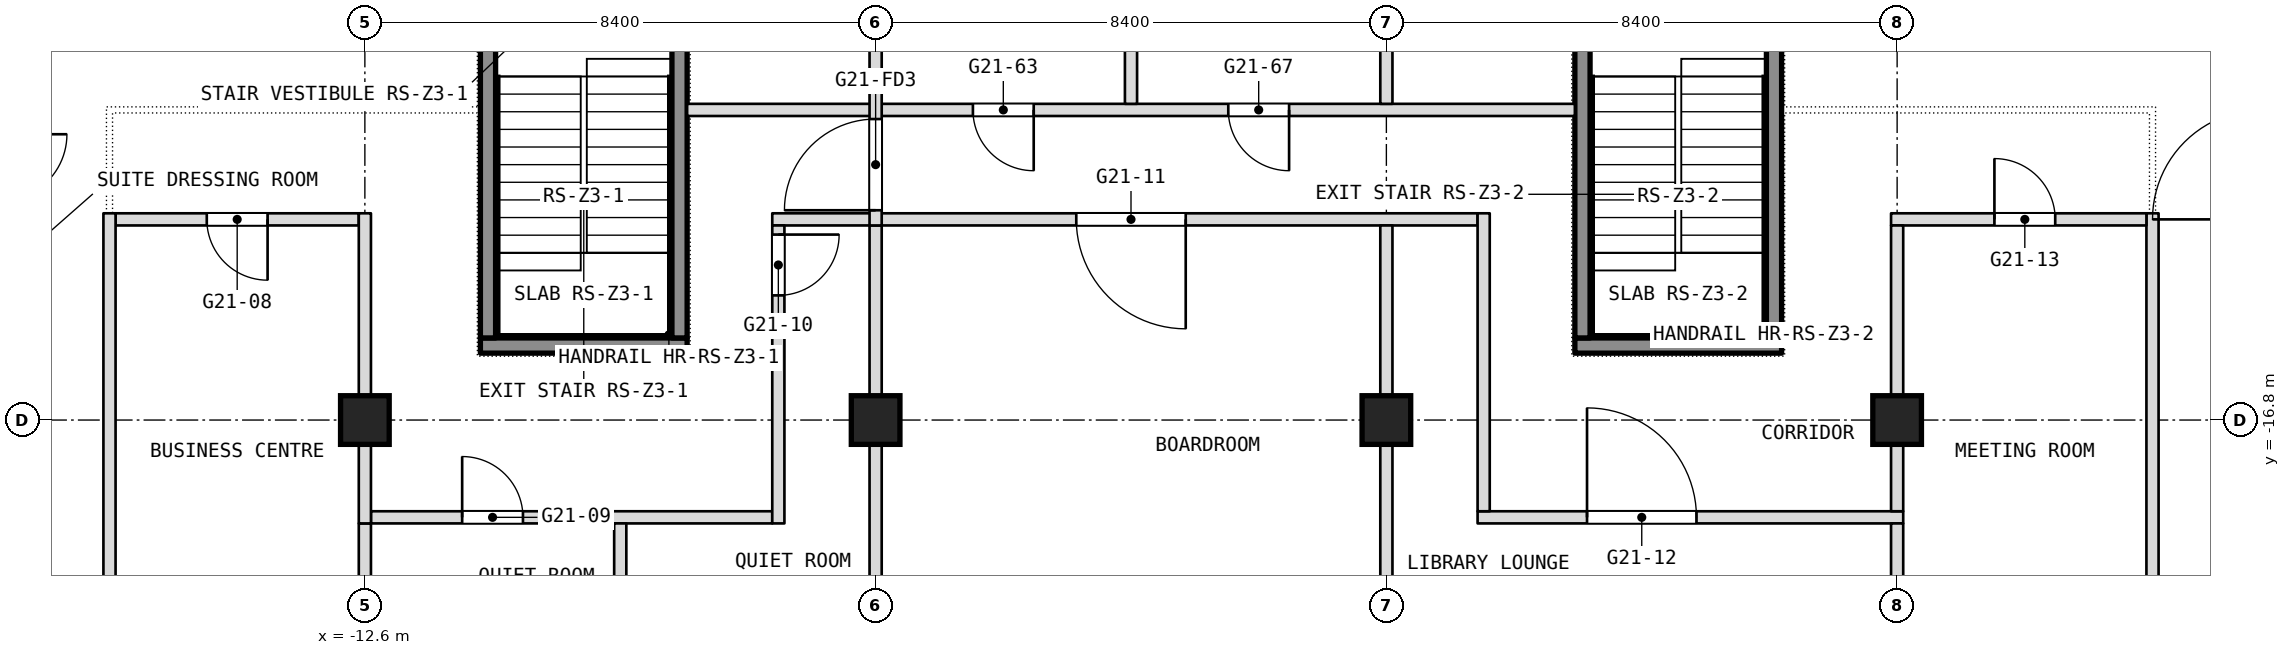
"""IFC4 building model, lengths in metres.
Left out: names, types, materials, properties, quantities, classifications, styles, units other than length and angle.
Written with IfcOpenShell. Run it as: python <this file> out.ifc"""

import sys

from ifc_helpers import new_model, si_unit, direction, frame, frame_2d, origin, origin_2d, place, context, subcontext, project, spatial, rectangle, extrude, element, fill, save


model = new_model("IFC4")
c1 = context("Model", 3, precision=1e-05, world=origin(), true_north=direction((0.0, 1.0)))
c2 = subcontext(c1, "Body", "Model", "MODEL_VIEW")
j1 = project(units=[si_unit("LENGTHUNIT", "METRE"), si_unit("PLANEANGLEUNIT", "RADIAN")], contexts=[c1])
p1 = place(None, origin())
s1 = spatial("IfcSite", under=j1, at=p1, CompositionType="ELEMENT")
p2 = place(p1, origin())
s2 = spatial("IfcBuilding", under=s1, at=p2, CompositionType="ELEMENT")
p3 = place(p2, frame((0.0, 0.0, 245.3)))
s3 = spatial("IfcBuildingStorey", under=s2, at=p3, CompositionType="ELEMENT", Elevation=245.3)
for number, where, z_axis, x_axis in (
    (1, (-12.6, -16.8, 0.0), (0.0, 0.0, 1.0), (1.0, 0.0, 0.0)),
    (2, (-4.2, -16.8, 0.0), (0.0, 0.0, 1.0), (1.0, 0.0, 0.0)),
    (3, (4.2, -16.8, 0.0), (0.0, 0.0, 1.0), (1.0, 0.0, 0.0)),
    (4, (12.6, -16.8, 0.0), (0.0, 0.0, 1.0), (1.0, 0.0, 0.0)),
):
    element("IfcColumn", number, at=place(p3, frame(where, z_axis=z_axis, x_axis=x_axis)), inside=s3, PredefinedType="COLUMN", context=c2, shape_type="SweptSolid", body=[
        extrude(rectangle(XDim=0.8, YDim=0.8, at=origin_2d()), origin(), (0.0, 0.0, 1.0), 3.6),
    ])
p4 = place(p3, frame((-12.5, -18.4, 0.0), z_axis=(0.0, 0.0, 1.0), x_axis=(1.0, 0.0, 0.0)))
e5 = element("IfcWall", 5, at=p4, inside=s3, PredefinedType="PARTITIONING", context=c2, shape_type="SweptSolid", body=[
    extrude(rectangle(XDim=6.6, YDim=0.2, at=frame_2d((3.3, 0.0))), origin(), (0.0, 0.0, 1.0), 3.34),
])
p5 = place(p4, frame((1.5, 0.0, 0.0)))
e6 = element("IfcOpeningElement", 6, at=p5, cuts=e5, PredefinedType="OPENING", context=c2, shape_type="SweptSolid", body=[
    extrude(rectangle(XDim=1.0, YDim=2.1, at=frame_2d((0.5, 1.05))), frame((0.0, 0.1, 0.0), z_axis=(0.0, -1.0, 0.0), x_axis=(1.0, 0.0, 0.0)), (0.0, 0.0, 1.0), 0.2),
])
p6 = place(p3, frame((5.7, -18.4, 0.0), z_axis=(0.0, 0.0, 1.0), x_axis=(1.0, 0.0, 0.0)))
e7 = element("IfcWall", 7, at=p6, inside=s3, PredefinedType="PARTITIONING", context=c2, shape_type="SweptSolid", body=[
    extrude(rectangle(XDim=7.0, YDim=0.2, at=frame_2d((3.5, 0.0))), origin(), (0.0, 0.0, 1.0), 3.34),
])
p7 = place(p6, frame((1.8, 0.0, 0.0)))
e8 = element("IfcOpeningElement", 8, at=p7, cuts=e7, PredefinedType="OPENING", context=c2, shape_type="SweptSolid", body=[
    extrude(rectangle(XDim=1.8, YDim=2.1, at=frame_2d((0.9, 1.05))), frame((0.0, 0.1, 0.0), z_axis=(0.0, -1.0, 0.0), x_axis=(1.0, 0.0, 0.0)), (0.0, 0.0, 1.0), 0.2),
])
p8 = place(p3, frame((16.8, -20.2, 0.0), z_axis=(0.0, 0.0, 1.0), x_axis=(0.0, 1.0, 0.0)))
e9 = element("IfcWall", 9, at=p8, inside=s3, PredefinedType="PARTITIONING", context=c2, shape_type="SweptSolid", body=[
    extrude(rectangle(XDim=6.8, YDim=0.2, at=frame_2d((3.4, 0.0))), origin(), (0.0, 0.0, 1.0), 3.34),
])
p9 = place(p3, frame((-16.7, -13.5, 0.0), z_axis=(0.0, 0.0, 1.0), x_axis=(1.0, 0.0, 0.0)))
e10 = element("IfcWall", 10, at=p9, inside=s3, PredefinedType="PARTITIONING", context=c2, shape_type="SweptSolid", body=[
    extrude(rectangle(XDim=4.0, YDim=0.2, at=frame_2d((2.0, 0.0))), origin(), (0.0, 0.0, 1.0), 3.34),
])
p10 = place(p9, frame((1.5, 0.0, 0.0)))
e11 = element("IfcOpeningElement", 11, at=p10, cuts=e10, PredefinedType="OPENING", context=c2, shape_type="SweptSolid", body=[
    extrude(rectangle(XDim=1.0, YDim=2.1, at=frame_2d((0.5, 1.05))), frame((0.0, 0.1, 0.0), z_axis=(0.0, -1.0, 0.0), x_axis=(1.0, 0.0, 0.0)), (0.0, 0.0, 1.0), 0.2),
])
p11 = place(p3, frame((-5.9, -13.5, 0.0), z_axis=(0.0, 0.0, 1.0), x_axis=(1.0, 0.0, 0.0)))
e12 = element("IfcWall", 12, at=p11, inside=s3, PredefinedType="PARTITIONING", context=c2, shape_type="SweptSolid", body=[
    extrude(rectangle(XDim=11.6, YDim=0.2, at=frame_2d((5.8, 0.0))), origin(), (0.0, 0.0, 1.0), 3.34),
])
p12 = place(p11, frame((5.0, 0.0, 0.0)))
e13 = element("IfcOpeningElement", 13, at=p12, cuts=e12, PredefinedType="OPENING", context=c2, shape_type="SweptSolid", body=[
    extrude(rectangle(XDim=1.8, YDim=2.1, at=frame_2d((0.9, 1.05))), frame((0.0, 0.1, 0.0), z_axis=(0.0, -1.0, 0.0), x_axis=(1.0, 0.0, 0.0)), (0.0, 0.0, 1.0), 0.2),
])
p13 = place(p3, frame((12.5, -13.5, 0.0), z_axis=(0.0, 0.0, 1.0), x_axis=(1.0, 0.0, 0.0)))
e14 = element("IfcWall", 14, at=p13, inside=s3, PredefinedType="PARTITIONING", context=c2, shape_type="SweptSolid", body=[
    extrude(rectangle(XDim=4.2, YDim=0.2, at=frame_2d((2.1, 0.0))), origin(), (0.0, 0.0, 1.0), 3.34),
])
p14 = place(p13, frame((1.7, 0.0, 0.0)))
e15 = element("IfcOpeningElement", 15, at=p14, cuts=e14, PredefinedType="OPENING", context=c2, shape_type="SweptSolid", body=[
    extrude(rectangle(XDim=1.0, YDim=2.1, at=frame_2d((0.5, 1.05))), frame((0.0, 0.1, 0.0), z_axis=(0.0, -1.0, 0.0), x_axis=(1.0, 0.0, 0.0)), (0.0, 0.0, 1.0), 0.2),
])
p15 = place(p3, frame((12.6, -20.0, 0.0), z_axis=(0.0, 0.0, 1.0), x_axis=(0.0, 1.0, 0.0)))
e16 = element("IfcWall", 16, at=p15, inside=s3, PredefinedType="PARTITIONING", context=c2, shape_type="SweptSolid", body=[
    extrude(rectangle(XDim=1.5, YDim=0.2, at=frame_2d((0.75, 0.0))), origin(), (0.0, 0.0, 1.0), 3.34),
])
p16 = place(p3, frame((12.6, -18.3, 0.0), z_axis=(0.0, 0.0, 1.0), x_axis=(0.0, 1.0, 0.0)))
e17 = element("IfcWall", 17, at=p16, inside=s3, PredefinedType="PARTITIONING", context=c2, shape_type="SweptSolid", body=[
    extrude(rectangle(XDim=4.7, YDim=0.2, at=frame_2d((2.35, 0.0))), origin(), (0.0, 0.0, 1.0), 3.34),
])
p17 = place(p3, frame((-7.3, -11.7, 0.0), z_axis=(0.0, 0.0, 1.0), x_axis=(1.0, 0.0, 0.0)))
e18 = element("IfcWall", 18, at=p17, inside=s3, PredefinedType="PARTITIONING", context=c2, shape_type="SweptSolid", body=[
    extrude(rectangle(XDim=14.6, YDim=0.2, at=frame_2d((7.3, 0.0))), origin(), (0.0, 0.0, 1.0), 3.34),
])
p18 = place(p17, frame((4.7, 0.0, 0.0)))
e19 = element("IfcOpeningElement", 19, at=p18, cuts=e18, PredefinedType="OPENING", context=c2, shape_type="SweptSolid", body=[
    extrude(rectangle(XDim=1.0, YDim=2.1, at=frame_2d((0.5, 1.05))), frame((0.0, 0.1, 0.0), z_axis=(0.0, -1.0, 0.0), x_axis=(1.0, 0.0, 0.0)), (0.0, 0.0, 1.0), 0.2),
])
p19 = place(p17, frame((8.9, 0.0, 0.0)))
e20 = element("IfcOpeningElement", 20, at=p19, cuts=e18, PredefinedType="OPENING", context=c2, shape_type="SweptSolid", body=[
    extrude(rectangle(XDim=1.0, YDim=2.1, at=frame_2d((0.5, 1.05))), frame((0.0, 0.1, 0.0), z_axis=(0.0, -1.0, 0.0), x_axis=(1.0, 0.0, 0.0)), (0.0, 0.0, 1.0), 0.2),
])
p20 = place(p3, frame((5.8, -18.3, 0.0), z_axis=(0.0, 0.0, 1.0), x_axis=(0.0, 1.0, 0.0)))
e21 = element("IfcWall", 21, at=p20, inside=s3, PredefinedType="PARTITIONING", context=c2, shape_type="SweptSolid", body=[
    extrude(rectangle(XDim=4.9, YDim=0.2, at=frame_2d((2.45, 0.0))), origin(), (0.0, 0.0, 1.0), 3.34),
])
p21 = place(p3, frame((4.2, -20.0, 0.0), z_axis=(0.0, 0.0, 1.0), x_axis=(0.0, 1.0, 0.0)))
e22 = element("IfcWall", 22, at=p21, inside=s3, PredefinedType="PARTITIONING", context=c2, shape_type="SweptSolid", body=[
    extrude(rectangle(XDim=6.4, YDim=0.2, at=frame_2d((3.2, 0.0))), origin(), (0.0, 0.0, 1.0), 3.34),
])
for number, where, z_axis, x_axis in (
    (23, (4.2, -11.6, 0.0), (0.0, 0.0, 1.0), (0.0, 1.0, 0.0)),
    (24, (0.0, -11.6, 0.0), (0.0, 0.0, 1.0), (0.0, 1.0, 0.0)),
):
    element("IfcWall", number, at=place(p3, frame(where, z_axis=z_axis, x_axis=x_axis)), inside=s3, PredefinedType="PARTITIONING", context=c2, shape_type="SweptSolid", body=[
        extrude(rectangle(XDim=9.7, YDim=0.2, at=frame_2d((4.85, 0.0))), origin(), (0.0, 0.0, 1.0), 3.34),
    ])
p22 = place(p3, frame((-4.2, -22.0, 0.0), z_axis=(0.0, 0.0, 1.0), x_axis=(0.0, 1.0, 0.0)))
e25 = element("IfcWall", 25, at=p22, inside=s3, PredefinedType="PARTITIONING", context=c2, shape_type="SweptSolid", body=[
    extrude(rectangle(XDim=8.4, YDim=0.2, at=frame_2d((4.2, 0.0))), origin(), (0.0, 0.0, 1.0), 3.34),
])
p23 = place(p22, frame((0.25, 0.0, 0.0)))
e26 = element("IfcOpeningElement", 26, at=p23, cuts=e25, PredefinedType="OPENING", context=c2, shape_type="SweptSolid", body=[
    extrude(rectangle(XDim=1.5, YDim=2.1, at=frame_2d((0.75, 1.05))), frame((0.0, 0.1, 0.0), z_axis=(0.0, -1.0, 0.0), x_axis=(1.0, 0.0, 0.0)), (0.0, 0.0, 1.0), 0.2),
])
p24 = place(p3, frame((-4.2, -13.6, 0.0), z_axis=(0.0, 0.0, 1.0), x_axis=(0.0, 1.0, 0.0)))
e27 = element("IfcWall", 27, at=p24, inside=s3, PredefinedType="PARTITIONING", context=c2, shape_type="SweptSolid", body=[
    extrude(rectangle(XDim=13.6, YDim=0.2, at=frame_2d((6.8, 0.0))), origin(), (0.0, 0.0, 1.0), 3.34),
])
p25 = place(p24, frame((11.95, 0.0, 0.0)))
e28 = element("IfcOpeningElement", 28, at=p25, cuts=e27, PredefinedType="OPENING", context=c2, shape_type="SweptSolid", body=[
    extrude(rectangle(XDim=1.5, YDim=2.1, at=frame_2d((0.75, 1.05))), frame((0.0, 0.1, 0.0), z_axis=(0.0, -1.0, 0.0), x_axis=(1.0, 0.0, 0.0)), (0.0, 0.0, 1.0), 0.2),
])
p26 = place(p24, frame((0.25, 0.0, 0.0)))
e29 = element("IfcOpeningElement", 29, at=p26, cuts=e27, PredefinedType="OPENING", context=c2, shape_type="SweptSolid", body=[
    extrude(rectangle(XDim=1.5, YDim=2.1, at=frame_2d((0.75, 1.05))), frame((0.0, 0.1, 0.0), z_axis=(0.0, -1.0, 0.0), x_axis=(1.0, 0.0, 0.0)), (0.0, 0.0, 1.0), 0.2),
])
p27 = place(p3, frame((-5.8, -18.5, 0.0), z_axis=(0.0, 0.0, 1.0), x_axis=(0.0, 1.0, 0.0)))
e30 = element("IfcWall", 30, at=p27, inside=s3, PredefinedType="PARTITIONING", context=c2, shape_type="SweptSolid", body=[
    extrude(rectangle(XDim=4.9, YDim=0.2, at=frame_2d((2.45, 0.0))), origin(), (0.0, 0.0, 1.0), 3.34),
])
p28 = place(p27, frame((3.75, 0.0, 0.0)))
e31 = element("IfcOpeningElement", 31, at=p28, cuts=e30, PredefinedType="OPENING", context=c2, shape_type="SweptSolid", body=[
    extrude(rectangle(XDim=1.0, YDim=2.1, at=frame_2d((0.5, 1.05))), frame((0.0, 0.1, 0.0), z_axis=(0.0, -1.0, 0.0), x_axis=(1.0, 0.0, 0.0)), (0.0, 0.0, 1.0), 0.2),
])
for number, where, z_axis, x_axis in (
    (32, (-8.4, -20.0, 0.0), (0.0, 0.0, 1.0), (0.0, 1.0, 0.0)),
    (33, (-12.6, -20.0, 0.0), (0.0, 0.0, 1.0), (0.0, 1.0, 0.0)),
):
    element("IfcWall", number, at=place(p3, frame(where, z_axis=z_axis, x_axis=x_axis)), inside=s3, PredefinedType="PARTITIONING", context=c2, shape_type="SweptSolid", body=[
        extrude(rectangle(XDim=1.5, YDim=0.2, at=frame_2d((0.75, 0.0))), origin(), (0.0, 0.0, 1.0), 3.34),
    ])
p29 = place(p3, frame((-12.6, -18.5, 0.0), z_axis=(0.0, 0.0, 1.0), x_axis=(0.0, 1.0, 0.0)))
e34 = element("IfcWall", 34, at=p29, inside=s3, PredefinedType="PARTITIONING", context=c2, shape_type="SweptSolid", body=[
    extrude(rectangle(XDim=5.1, YDim=0.2, at=frame_2d((2.55, 0.0))), origin(), (0.0, 0.0, 1.0), 3.34),
])
p30 = place(p3, frame((-16.8, -20.2, 0.0), z_axis=(0.0, 0.0, 1.0), x_axis=(0.0, 1.0, 0.0)))
e35 = element("IfcWall", 35, at=p30, inside=s3, PredefinedType="PARTITIONING", context=c2, shape_type="SweptSolid", body=[
    extrude(rectangle(XDim=6.8, YDim=0.2, at=frame_2d((3.4, 0.0))), origin(), (0.0, 0.0, 1.0), 3.34),
])
p31 = place(p3, frame((-10.7, -15.575, 0.1), z_axis=(0.0, 0.0, 1.0), x_axis=(1.0, 0.0, 0.0)))
e36 = element("IfcWall", 36, at=p31, inside=s3, PredefinedType="SHEAR", context=c2, shape_type="SweptSolid", body=[
    extrude(rectangle(XDim=3.4, YDim=0.25, at=frame_2d((1.7, 0.0))), origin(), (0.0, 0.0, 1.0), 3.6),
])
for number, where, z_axis, x_axis in (
    (37, (-10.575, -15.45, 0.1), (0.0, 0.0, 1.0), (0.0, 1.0, 0.0)),
    (38, (-7.425, -15.45, 0.1), (0.0, 0.0, 1.0), (0.0, 1.0, 0.0)),
):
    element("IfcWall", number, at=place(p3, frame(where, z_axis=z_axis, x_axis=x_axis)), inside=s3, PredefinedType="SHEAR", context=c2, shape_type="SweptSolid", body=[
        extrude(rectangle(XDim=5.7, YDim=0.25, at=frame_2d((2.85, 0.0))), origin(), (0.0, 0.0, 1.0), 3.6),
    ])
p32 = place(p3, frame((7.3, -15.575, 0.1), z_axis=(0.0, 0.0, 1.0), x_axis=(1.0, 0.0, 0.0)))
e39 = element("IfcWall", 39, at=p32, inside=s3, PredefinedType="SHEAR", context=c2, shape_type="SweptSolid", body=[
    extrude(rectangle(XDim=3.4, YDim=0.25, at=frame_2d((1.7, 0.0))), origin(), (0.0, 0.0, 1.0), 3.6),
])
for number, where, z_axis, x_axis in (
    (40, (7.425, -15.45, 0.1), (0.0, 0.0, 1.0), (0.0, 1.0, 0.0)),
    (41, (10.575, -15.45, 0.1), (0.0, 0.0, 1.0), (0.0, 1.0, 0.0)),
):
    element("IfcWall", number, at=place(p3, frame(where, z_axis=z_axis, x_axis=x_axis)), inside=s3, PredefinedType="SHEAR", context=c2, shape_type="SweptSolid", body=[
        extrude(rectangle(XDim=5.7, YDim=0.25, at=frame_2d((2.85, 0.0))), origin(), (0.0, 0.0, 1.0), 3.6),
    ])
p33 = place(p5, origin())
e42 = element("IfcDoor", 42, at=p33, inside=s3, OperationType="SINGLE_SWING_RIGHT", PredefinedType="DOOR", context=c2, shape_type="SweptSolid", body=[
    extrude(rectangle(XDim=1.0, YDim=2.1, at=frame_2d((0.5, 1.05))), frame((0.0, 0.025, 0.0), z_axis=(0.0, -1.0, 0.0), x_axis=(1.0, 0.0, 0.0)), (0.0, 0.0, 1.0), 0.05),
])
fill(e6, e42)
p34 = place(p7, origin())
e43 = element("IfcDoor", 43, at=p34, inside=s3, OperationType="DOUBLE_DOOR_SINGLE_SWING", PredefinedType="DOOR", context=c2, shape_type="SweptSolid", body=[
    extrude(rectangle(XDim=1.8, YDim=2.1, at=frame_2d((0.9, 1.05))), frame((0.0, 0.025, 0.0), z_axis=(0.0, -1.0, 0.0), x_axis=(1.0, 0.0, 0.0)), (0.0, 0.0, 1.0), 0.05),
])
fill(e8, e43)
p35 = place(p10, origin())
e44 = element("IfcDoor", 44, at=p35, inside=s3, OperationType="SINGLE_SWING_RIGHT", PredefinedType="DOOR", context=c2, shape_type="SweptSolid", body=[
    extrude(rectangle(XDim=1.0, YDim=2.1, at=frame_2d((0.5, 1.05))), frame((0.0, 0.025, 0.0), z_axis=(0.0, -1.0, 0.0), x_axis=(1.0, 0.0, 0.0)), (0.0, 0.0, 1.0), 0.05),
])
fill(e11, e44)
p36 = place(p12, origin())
e45 = element("IfcDoor", 45, at=p36, inside=s3, OperationType="DOUBLE_DOOR_SINGLE_SWING", PredefinedType="DOOR", context=c2, shape_type="SweptSolid", body=[
    extrude(rectangle(XDim=1.8, YDim=2.1, at=frame_2d((0.9, 1.05))), frame((0.0, 0.025, 0.0), z_axis=(0.0, -1.0, 0.0), x_axis=(1.0, 0.0, 0.0)), (0.0, 0.0, 1.0), 0.05),
])
fill(e13, e45)
p37 = place(p14, origin())
e46 = element("IfcDoor", 46, at=p37, inside=s3, OperationType="SINGLE_SWING_LEFT", PredefinedType="DOOR", context=c2, shape_type="SweptSolid", body=[
    extrude(rectangle(XDim=1.0, YDim=2.1, at=frame_2d((0.5, 1.05))), frame((0.0, 0.025, 0.0), z_axis=(0.0, -1.0, 0.0), x_axis=(1.0, 0.0, 0.0)), (0.0, 0.0, 1.0), 0.05),
])
fill(e15, e46)
p38 = place(p18, origin())
e47 = element("IfcDoor", 47, at=p38, inside=s3, OperationType="SINGLE_SWING_LEFT", PredefinedType="DOOR", context=c2, shape_type="SweptSolid", body=[
    extrude(rectangle(XDim=1.0, YDim=2.1, at=frame_2d((0.5, 1.05))), frame((0.0, 0.025, 0.0), z_axis=(0.0, -1.0, 0.0), x_axis=(1.0, 0.0, 0.0)), (0.0, 0.0, 1.0), 0.05),
])
fill(e19, e47)
p39 = place(p19, origin())
e48 = element("IfcDoor", 48, at=p39, inside=s3, OperationType="SINGLE_SWING_LEFT", PredefinedType="DOOR", context=c2, shape_type="SweptSolid", body=[
    extrude(rectangle(XDim=1.0, YDim=2.1, at=frame_2d((0.5, 1.05))), frame((0.0, 0.025, 0.0), z_axis=(0.0, -1.0, 0.0), x_axis=(1.0, 0.0, 0.0)), (0.0, 0.0, 1.0), 0.05),
])
fill(e20, e48)
p40 = place(p28, origin())
e49 = element("IfcDoor", 49, at=p40, inside=s3, OperationType="SINGLE_SWING_RIGHT", PredefinedType="DOOR", context=c2, shape_type="SweptSolid", body=[
    extrude(rectangle(XDim=1.0, YDim=2.1, at=frame_2d((0.5, 1.05))), frame((0.0, 0.025, 0.0), z_axis=(0.0, -1.0, 0.0), x_axis=(1.0, 0.0, 0.0)), (0.0, 0.0, 1.0), 0.05),
])
fill(e31, e49)
p41 = place(p26, origin())
e50 = element("IfcDoor", 50, at=p41, inside=s3, OperationType="DOUBLE_DOOR_DOUBLE_SWING", PredefinedType="DOOR", context=c2, shape_type="SweptSolid", body=[
    extrude(rectangle(XDim=1.5, YDim=2.1, at=frame_2d((0.75, 1.05))), frame((0.0, 0.025, 0.0), z_axis=(0.0, -1.0, 0.0), x_axis=(1.0, 0.0, 0.0)), (0.0, 0.0, 1.0), 0.05),
])
fill(e29, e50)
save(model, sys.argv[1])
